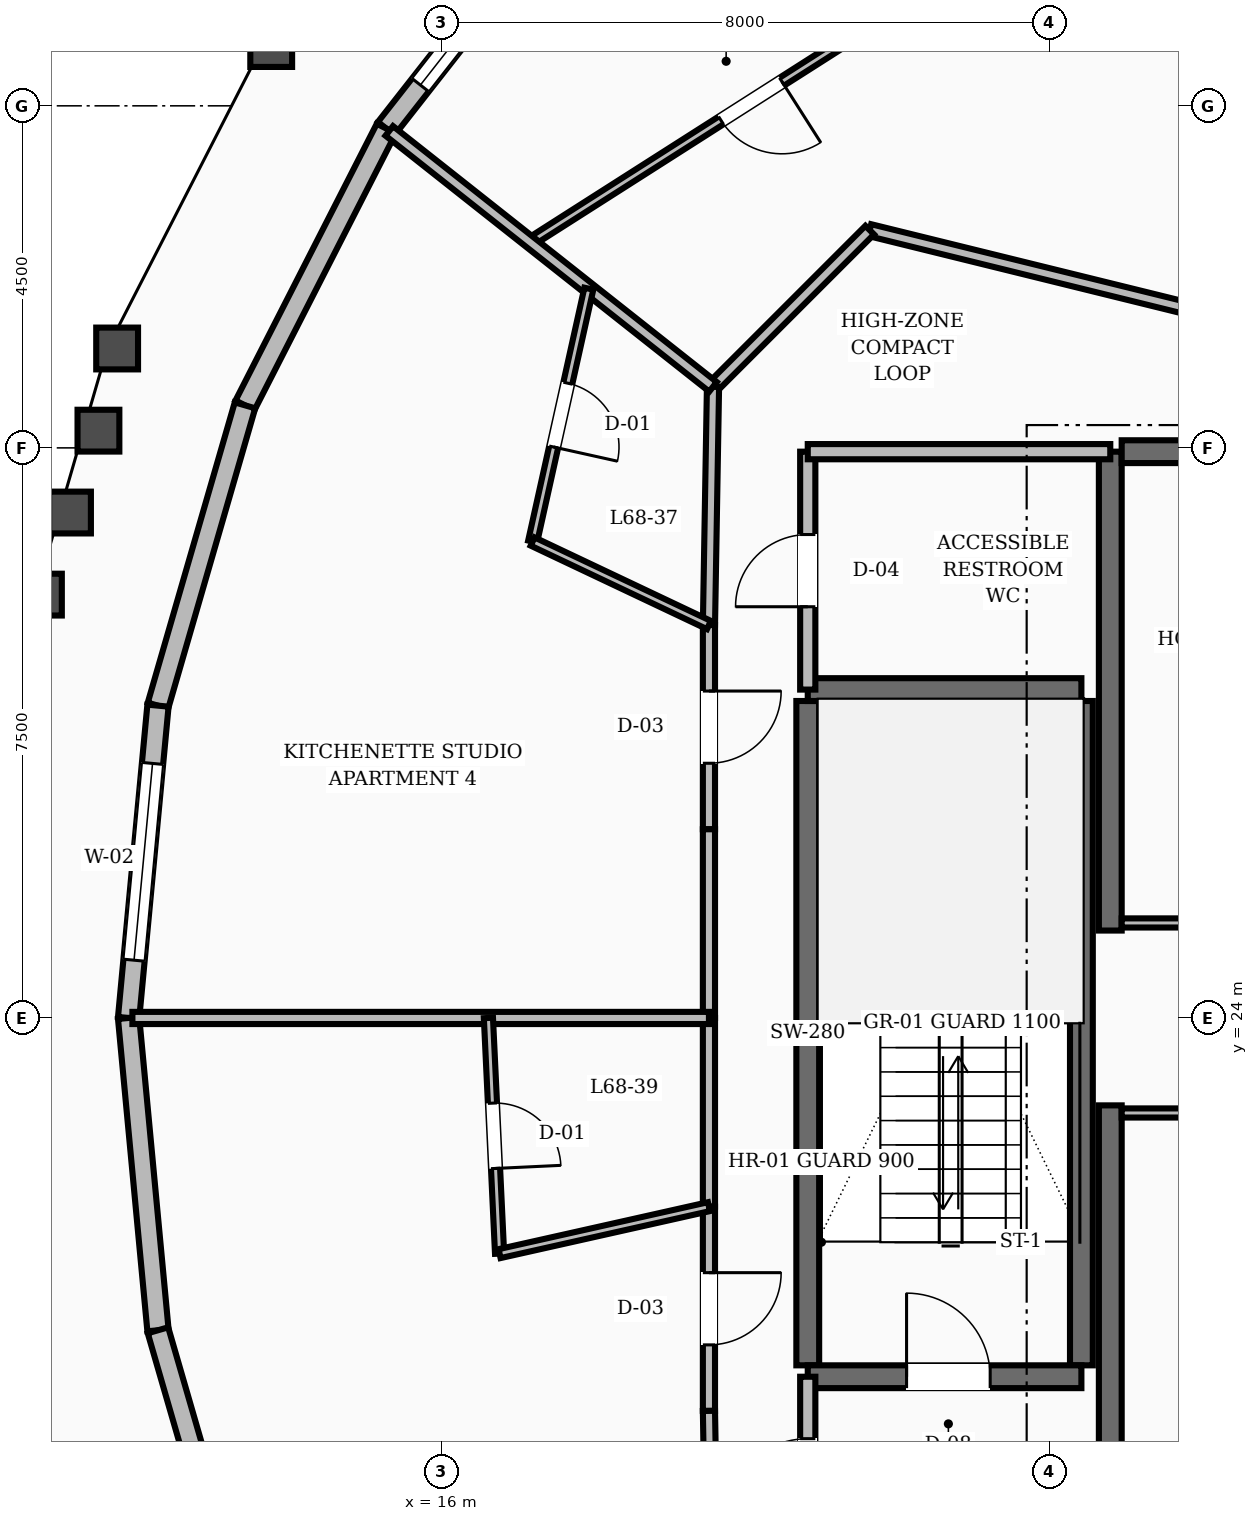
"""IFC4 building model, lengths in metres.
Left out: names, types, materials, properties, quantities, classifications, styles, units other than length and angle.
Written with IfcOpenShell. Run it as: python <this file> out.ifc"""

import sys

from ifc_helpers import new_model, si_unit, direction, frame, frame_2d, origin, place, context, subcontext, project, spatial, rectangle, extrude, element, fill, save


model = new_model("IFC4")
c1 = context("Model", 3, precision=1e-05, world=origin(), true_north=direction((0.0, 1.0)))
c2 = subcontext(c1, "Body", "Model", "MODEL_VIEW")
j1 = project(units=[si_unit("LENGTHUNIT", "METRE"), si_unit("PLANEANGLEUNIT", "RADIAN")], contexts=[c1])
p1 = place(None, origin())
s1 = spatial("IfcSite", under=j1, at=p1, CompositionType="ELEMENT")
p2 = place(p1, origin())
s2 = spatial("IfcBuilding", under=s1, at=p2, CompositionType="ELEMENT")
p3 = place(p2, frame((0.0, 0.0, 261.6)))
s3 = spatial("IfcBuildingStorey", under=s2, at=p3, CompositionType="ELEMENT", Elevation=261.6)
for number, where, z_axis, x_axis in (
    (1, (24.8, 16.55, 0.0), (0.0, 0.0, 1.0), (0.0, 1.0, 0.0)),
    (2, (24.8, 25.15, 0.0), (0.0, 0.0, 1.0), (0.0, 1.0, 0.0)),
):
    element("IfcWall", number, at=place(p3, frame(where, z_axis=z_axis, x_axis=x_axis)), inside=s3, PredefinedType="SHEAR", context=c2, shape_type="SweptSolid", body=[
        extrude(rectangle(XDim=6.3, YDim=0.3, at=frame_2d((3.15, 0.0))), origin(), (0.0, 0.0, 1.0), 3.6),
    ])
p4 = place(p3, frame((24.95, 31.45, 0.0), z_axis=(0.0, 0.0, 1.0), x_axis=(1.0, 0.0, 0.0)))
e3 = element("IfcWall", 3, at=p4, inside=s3, PredefinedType="SHEAR", context=c2, shape_type="SweptSolid", body=[
    extrude(rectangle(XDim=3.25, YDim=0.3, at=frame_2d((1.625, 0.0))), origin(), (0.0, 0.0, 1.0), 3.6),
])
for number, where, z_axis, x_axis in (
    (4, (20.82, 19.43, 0.0), (0.0, 0.0, 1.0), (0.0, 1.0, 0.0)),
    (5, (24.42, 19.43, 0.0), (0.0, 0.0, 1.0), (0.0, 1.0, 0.0)),
):
    element("IfcWall", number, at=place(p3, frame(where, z_axis=z_axis, x_axis=x_axis)), inside=s3, PredefinedType="SHEAR", context=c2, shape_type="SweptSolid", body=[
        extrude(rectangle(XDim=8.74, YDim=0.3, at=frame_2d((4.37, 0.0))), origin(), (0.0, 0.0, 1.0), 3.6),
    ])
p5 = place(p3, frame((20.82, 19.28, 0.0), z_axis=(0.0, 0.0, 1.0), x_axis=(1.0, 0.0, 0.0)))
e6 = element("IfcWall", 6, at=p5, inside=s3, PredefinedType="SHEAR", context=c2, shape_type="SweptSolid", body=[
    extrude(rectangle(XDim=3.6, YDim=0.3, at=frame_2d((1.8, 0.0))), origin(), (0.0, 0.0, 1.0), 3.6),
])
p6 = place(p5, frame((1.3, 0.0, 0.0)))
e7 = element("IfcOpeningElement", 7, at=p6, cuts=e6, PredefinedType="OPENING", context=c2, shape_type="SweptSolid", body=[
    extrude(rectangle(XDim=1.1, YDim=2.1, at=frame_2d((0.55, 1.05))), frame((0.0, 0.16, 0.0), z_axis=(0.0, -1.0, 0.0), x_axis=(1.0, 0.0, 0.0)), (0.0, 0.0, 1.0), 0.32),
])
p7 = place(p3, frame((20.82, 28.32, 0.0), z_axis=(0.0, 0.0, 1.0), x_axis=(1.0, 0.0, 0.0)))
e8 = element("IfcWall", 8, at=p7, inside=s3, PredefinedType="SHEAR", context=c2, shape_type="SweptSolid", body=[
    extrude(rectangle(XDim=3.6, YDim=0.3, at=frame_2d((1.8, 0.0))), origin(), (0.0, 0.0, 1.0), 3.6),
])
p8 = place(p3, frame((17.777, 38.893, 0.0), z_axis=(0.0, 0.0, 1.0), x_axis=(-0.616903837432, -0.787038534864, 0.0)))
e9 = element("IfcWall", 9, at=p8, inside=s3, PredefinedType="STANDARD", context=c2, shape_type="SweptSolid", body=[
    extrude(rectangle(XDim=4.055, YDim=0.28, at=frame_2d((2.028, 0.0))), origin(), (0.0, 0.0, 1.0), 2.88),
])
p9 = place(p8, frame((0.728, 0.0, 0.8)))
e10 = element("IfcOpeningElement", 10, at=p9, cuts=e9, PredefinedType="OPENING", context=c2, shape_type="SweptSolid", body=[
    extrude(rectangle(XDim=2.6, YDim=1.65, at=frame_2d((1.3, 0.825))), frame((0.0, 0.15, 0.0), z_axis=(0.0, -1.0, 0.0), x_axis=(1.0, 0.0, 0.0)), (0.0, 0.0, 1.0), 0.3),
])
p10 = place(p3, frame((15.275, 35.701, 0.0), z_axis=(0.0, 0.0, 1.0), x_axis=(-0.454698544749, -0.89064540273, 0.0)))
e11 = element("IfcWall", 11, at=p10, inside=s3, PredefinedType="STANDARD", context=c2, shape_type="SweptSolid", body=[
    extrude(rectangle(XDim=4.088, YDim=0.28, at=frame_2d((2.044, 0.0))), origin(), (0.0, 0.0, 1.0), 2.88),
])
p11 = place(p3, frame((13.416, 32.06, 0.0), z_axis=(0.0, 0.0, 1.0), x_axis=(-0.278246863013, -0.960509595592, 0.0)))
e12 = element("IfcWall", 12, at=p11, inside=s3, PredefinedType="STANDARD", context=c2, shape_type="SweptSolid", body=[
    extrude(rectangle(XDim=4.113, YDim=0.28, at=frame_2d((2.057, 0.0))), origin(), (0.0, 0.0, 1.0), 2.88),
])
p12 = place(p3, frame((12.271, 28.109, 0.0), z_axis=(0.0, 0.0, 1.0), x_axis=(-0.093644905581, -0.995605660721, 0.0)))
e13 = element("IfcWall", 13, at=p12, inside=s3, PredefinedType="STANDARD", context=c2, shape_type="SweptSolid", body=[
    extrude(rectangle(XDim=4.127, YDim=0.28, at=frame_2d((2.063, 0.0))), origin(), (0.0, 0.0, 1.0), 2.88),
])
p13 = place(p12, frame((0.763, 0.0, 0.8)))
e14 = element("IfcOpeningElement", 14, at=p13, cuts=e13, PredefinedType="OPENING", context=c2, shape_type="SweptSolid", body=[
    extrude(rectangle(XDim=2.6, YDim=1.65, at=frame_2d((1.3, 0.825))), frame((0.0, 0.15, 0.0), z_axis=(0.0, -1.0, 0.0), x_axis=(1.0, 0.0, 0.0)), (0.0, 0.0, 1.0), 0.3),
])
p14 = place(p3, frame((11.885, 24.0, 0.0), z_axis=(0.0, 0.0, 1.0), x_axis=(0.093644905581, -0.995605660721, 0.0)))
e15 = element("IfcWall", 15, at=p14, inside=s3, PredefinedType="STANDARD", context=c2, shape_type="SweptSolid", body=[
    extrude(rectangle(XDim=4.127, YDim=0.28, at=frame_2d((2.063, 0.0))), origin(), (0.0, 0.0, 1.0), 2.88),
])
p15 = place(p3, frame((12.271, 19.891, 0.0), z_axis=(0.0, 0.0, 1.0), x_axis=(0.278246863013, -0.960509595592, 0.0)))
e16 = element("IfcWall", 16, at=p15, inside=s3, PredefinedType="STANDARD", context=c2, shape_type="SweptSolid", body=[
    extrude(rectangle(XDim=4.113, YDim=0.28, at=frame_2d((2.057, 0.0))), origin(), (0.0, 0.0, 1.0), 2.88),
])
p16 = place(p3, frame((20.82, 16.55, 0.0), z_axis=(0.0, 0.0, 1.0), x_axis=(0.0, 1.0, 0.0)))
e17 = element("IfcWall", 17, at=p16, inside=s3, PredefinedType="SOLIDWALL", context=c2, shape_type="SweptSolid", body=[
    extrude(rectangle(XDim=2.73, YDim=0.2, at=frame_2d((1.365, 0.0))), origin(), (0.0, 0.0, 1.0), 2.87),
])
p17 = place(p16, frame((0.815, 0.0, 0.0)))
e18 = element("IfcOpeningElement", 18, at=p17, cuts=e17, PredefinedType="OPENING", context=c2, shape_type="SweptSolid", body=[
    extrude(rectangle(XDim=1.1, YDim=2.1, at=frame_2d((0.55, 1.05))), frame((0.0, 0.11, 0.0), z_axis=(0.0, -1.0, 0.0), x_axis=(1.0, 0.0, 0.0)), (0.0, 0.0, 1.0), 0.22),
])
p18 = place(p3, frame((20.82, 28.32, 0.0), z_axis=(0.0, 0.0, 1.0), x_axis=(0.0, 1.0, 0.0)))
e19 = element("IfcWall", 19, at=p18, inside=s3, PredefinedType="SOLIDWALL", context=c2, shape_type="SweptSolid", body=[
    extrude(rectangle(XDim=3.13, YDim=0.2, at=frame_2d((1.565, 0.0))), origin(), (0.0, 0.0, 1.0), 2.87),
])
p19 = place(p18, frame((1.09, 0.0, 0.0)))
e20 = element("IfcOpeningElement", 20, at=p19, cuts=e19, PredefinedType="OPENING", context=c2, shape_type="SweptSolid", body=[
    extrude(rectangle(XDim=0.95, YDim=2.1, at=frame_2d((0.475, 1.05))), frame((0.0, 0.11, 0.0), z_axis=(0.0, -1.0, 0.0), x_axis=(1.0, 0.0, 0.0)), (0.0, 0.0, 1.0), 0.22),
])
p20 = place(p3, frame((20.82, 31.45, 0.0), z_axis=(0.0, 0.0, 1.0), x_axis=(1.0, 0.0, 0.0)))
e21 = element("IfcWall", 21, at=p20, inside=s3, PredefinedType="SOLIDWALL", context=c2, shape_type="SweptSolid", body=[
    extrude(rectangle(XDim=3.98, YDim=0.2, at=frame_2d((1.99, 0.0))), origin(), (0.0, 0.0, 1.0), 2.87),
])
p21 = place(p3, frame((24.95, 25.25, 0.0), z_axis=(0.0, 0.0, 1.0), x_axis=(1.0, 0.0, 0.0)))
e22 = element("IfcWall", 22, at=p21, inside=s3, PredefinedType="PARTITIONING", context=c2, shape_type="SweptSolid", body=[
    extrude(rectangle(XDim=3.2, YDim=0.12, at=frame_2d((1.6, 0.0))), origin(), (0.0, 0.0, 1.0), 2.87),
])
p22 = place(p21, frame((1.125, 0.0, 0.0)))
e23 = element("IfcOpeningElement", 23, at=p22, cuts=e22, PredefinedType="OPENING", context=c2, shape_type="SweptSolid", body=[
    extrude(rectangle(XDim=0.95, YDim=2.1, at=frame_2d((0.475, 1.05))), frame((0.0, 0.07, 0.0), z_axis=(0.0, -1.0, 0.0), x_axis=(1.0, 0.0, 0.0)), (0.0, 0.0, 1.0), 0.14),
])
p23 = place(p3, frame((24.95, 22.75, 0.0), z_axis=(0.0, 0.0, 1.0), x_axis=(1.0, 0.0, 0.0)))
e24 = element("IfcWall", 24, at=p23, inside=s3, PredefinedType="PARTITIONING", context=c2, shape_type="SweptSolid", body=[
    extrude(rectangle(XDim=3.2, YDim=0.12, at=frame_2d((1.6, 0.0))), origin(), (0.0, 0.0, 1.0), 2.87),
])
p24 = place(p23, frame((1.125, 0.0, 0.0)))
e25 = element("IfcOpeningElement", 25, at=p24, cuts=e24, PredefinedType="OPENING", context=c2, shape_type="SweptSolid", body=[
    extrude(rectangle(XDim=0.95, YDim=2.1, at=frame_2d((0.475, 1.05))), frame((0.0, 0.07, 0.0), z_axis=(0.0, -1.0, 0.0), x_axis=(1.0, 0.0, 0.0)), (0.0, 0.0, 1.0), 0.14),
])
p25 = place(p3, frame((25.752, 33.35, 0.0), z_axis=(0.0, 0.0, 1.0), x_axis=(-0.970939799552, 0.239323850978, 0.0)))
e26 = element("IfcWall", 26, at=p25, inside=s3, PredefinedType="SOLIDWALL", context=c2, shape_type="SweptSolid", body=[
    extrude(rectangle(XDim=4.241, YDim=0.16, at=frame_2d((2.12, 0.0))), origin(), (0.0, 0.0, 1.0), 2.87),
])
p26 = place(p3, frame((21.635, 34.365, 0.0), z_axis=(0.0, 0.0, 1.0), x_axis=(-0.707106781187, -0.707106781187, 0.0)))
e27 = element("IfcWall", 27, at=p26, inside=s3, PredefinedType="SOLIDWALL", context=c2, shape_type="SweptSolid", body=[
    extrude(rectangle(XDim=2.916, YDim=0.16, at=frame_2d((1.458, 0.0))), origin(), (0.0, 0.0, 1.0), 2.87),
])
p27 = place(p3, frame((19.573, 32.303, 0.0), z_axis=(0.0, 0.0, 1.0), x_axis=(-0.016981035134, -0.999855811828, 0.0)))
e28 = element("IfcWall", 28, at=p27, inside=s3, PredefinedType="SOLIDWALL", context=c2, shape_type="SweptSolid", body=[
    extrude(rectangle(XDim=3.134, YDim=0.16, at=frame_2d((1.567, 0.0))), origin(), (0.0, 0.0, 1.0), 2.87),
])
p28 = place(p3, frame((19.52, 29.169, 0.0), z_axis=(0.0, 0.0, 1.0), x_axis=(0.0, -1.0, 0.0)))
e29 = element("IfcWall", 29, at=p28, inside=s3, PredefinedType="SOLIDWALL", context=c2, shape_type="SweptSolid", body=[
    extrude(rectangle(XDim=2.687, YDim=0.16, at=frame_2d((1.344, 0.0))), origin(), (0.0, 0.0, 1.0), 2.87),
])
p29 = place(p28, frame((0.868, 0.0, 0.0)))
e30 = element("IfcOpeningElement", 30, at=p29, cuts=e29, PredefinedType="OPENING", context=c2, shape_type="SweptSolid", body=[
    extrude(rectangle(XDim=0.95, YDim=2.1, at=frame_2d((0.475, 1.05))), frame((0.0, 0.09, 0.0), z_axis=(0.0, -1.0, 0.0), x_axis=(1.0, 0.0, 0.0)), (0.0, 0.0, 1.0), 0.18),
])
for number, where, z_axis, x_axis in (
    (31, (19.52, 26.482, 0.0), (0.0, 0.0, 1.0), (0.0, -1.0, 0.0)),
    (32, (19.52, 24.0, 0.0), (0.0, 0.0, 1.0), (0.0, -1.0, 0.0)),
):
    element("IfcWall", number, at=place(p3, frame(where, z_axis=z_axis, x_axis=x_axis)), inside=s3, PredefinedType="SOLIDWALL", context=c2, shape_type="SweptSolid", body=[
        extrude(rectangle(XDim=2.482, YDim=0.16, at=frame_2d((1.241, 0.0))), origin(), (0.0, 0.0, 1.0), 2.87),
    ])
p30 = place(p3, frame((19.52, 21.518, 0.0), z_axis=(0.0, 0.0, 1.0), x_axis=(0.0, -1.0, 0.0)))
e33 = element("IfcWall", 33, at=p30, inside=s3, PredefinedType="SOLIDWALL", context=c2, shape_type="SweptSolid", body=[
    extrude(rectangle(XDim=2.687, YDim=0.16, at=frame_2d((1.344, 0.0))), origin(), (0.0, 0.0, 1.0), 2.87),
])
p31 = place(p30, frame((0.868, 0.0, 0.0)))
e34 = element("IfcOpeningElement", 34, at=p31, cuts=e33, PredefinedType="OPENING", context=c2, shape_type="SweptSolid", body=[
    extrude(rectangle(XDim=0.95, YDim=2.1, at=frame_2d((0.475, 1.05))), frame((0.0, 0.09, 0.0), z_axis=(0.0, -1.0, 0.0), x_axis=(1.0, 0.0, 0.0)), (0.0, 0.0, 1.0), 0.18),
])
p32 = place(p3, frame((19.52, 18.831, 0.0), z_axis=(0.0, 0.0, 1.0), x_axis=(0.016981035134, -0.999855811828, 0.0)))
e35 = element("IfcWall", 35, at=p32, inside=s3, PredefinedType="SOLIDWALL", context=c2, shape_type="SweptSolid", body=[
    extrude(rectangle(XDim=3.134, YDim=0.16, at=frame_2d((1.567, 0.0))), origin(), (0.0, 0.0, 1.0), 2.87),
])
p33 = place(p3, frame((22.993, 37.921, 0.0), z_axis=(0.0, 0.0, 1.0), x_axis=(-0.843220391553, -0.537568015482, 0.0)))
e36 = element("IfcWall", 36, at=p33, inside=s3, PredefinedType="PARTITIONING", context=c2, shape_type="SweptSolid", body=[
    extrude(rectangle(XDim=6.91, YDim=0.12, at=frame_2d((3.455, 0.0))), origin(), (0.0, 0.0, 1.0), 2.87),
])
p34 = place(p33, frame((2.98, 0.0, 0.0)))
e37 = element("IfcOpeningElement", 37, at=p34, cuts=e36, PredefinedType="OPENING", context=c2, shape_type="SweptSolid", body=[
    extrude(rectangle(XDim=0.95, YDim=2.1, at=frame_2d((0.475, 1.05))), frame((0.0, 0.07, 0.0), z_axis=(0.0, -1.0, 0.0), x_axis=(1.0, 0.0, 0.0)), (0.0, 0.0, 1.0), 0.14),
])
p35 = place(p3, frame((19.573, 32.303, 0.0), z_axis=(0.0, 0.0, 1.0), x_axis=(-0.784496994248, 0.6201326197, 0.0)))
e38 = element("IfcWall", 38, at=p35, inside=s3, PredefinedType="SOLIDWALL", context=c2, shape_type="SweptSolid", body=[
    extrude(rectangle(XDim=5.429, YDim=0.16, at=frame_2d((2.714, 0.0))), origin(), (0.0, 0.0, 1.0), 2.87),
])
p36 = place(p3, frame((17.94, 33.594, 0.0), z_axis=(0.0, 0.0, 1.0), x_axis=(-0.216998726361, -0.976171886892, 0.0)))
e39 = element("IfcWall", 39, at=p36, inside=s3, PredefinedType="PARTITIONING", context=c2, shape_type="SweptSolid", body=[
    extrude(rectangle(XDim=3.408, YDim=0.12, at=frame_2d((1.704, 0.0))), origin(), (0.0, 0.0, 1.0), 2.87),
])
p37 = place(p36, frame((1.274, 0.0, 0.0)))
e40 = element("IfcOpeningElement", 40, at=p37, cuts=e39, PredefinedType="OPENING", context=c2, shape_type="SweptSolid", body=[
    extrude(rectangle(XDim=0.86, YDim=2.1, at=frame_2d((0.43, 1.05))), frame((0.0, 0.07, 0.0), z_axis=(0.0, -1.0, 0.0), x_axis=(1.0, 0.0, 0.0)), (0.0, 0.0, 1.0), 0.14),
])
p38 = place(p3, frame((19.52, 29.169, 0.0), z_axis=(0.0, 0.0, 1.0), x_axis=(-0.90379206637, 0.427971845764, 0.0)))
e41 = element("IfcWall", 41, at=p38, inside=s3, PredefinedType="PARTITIONING", context=c2, shape_type="SweptSolid", body=[
    extrude(rectangle(XDim=2.566, YDim=0.12, at=frame_2d((1.283, 0.0))), origin(), (0.0, 0.0, 1.0), 2.87),
])
p39 = place(p3, frame((19.52, 24.0, 0.0), z_axis=(0.0, 0.0, 1.0), x_axis=(-1.0, 0.0, 0.0)))
e42 = element("IfcWall", 42, at=p39, inside=s3, PredefinedType="SOLIDWALL", context=c2, shape_type="SweptSolid", body=[
    extrude(rectangle(XDim=7.585, YDim=0.16, at=frame_2d((3.792, 0.0))), origin(), (0.0, 0.0, 1.0), 2.87),
])
p40 = place(p3, frame((16.619, 24.0, 0.0), z_axis=(0.0, 0.0, 1.0), x_axis=(0.047273648919, -0.99888197607, 0.0)))
e43 = element("IfcWall", 43, at=p40, inside=s3, PredefinedType="PARTITIONING", context=c2, shape_type="SweptSolid", body=[
    extrude(rectangle(XDim=3.104, YDim=0.12, at=frame_2d((1.552, 0.0))), origin(), (0.0, 0.0, 1.0), 2.87),
])
p41 = place(p40, frame((1.122, 0.0, 0.0)))
e44 = element("IfcOpeningElement", 44, at=p41, cuts=e43, PredefinedType="OPENING", context=c2, shape_type="SweptSolid", body=[
    extrude(rectangle(XDim=0.86, YDim=2.1, at=frame_2d((0.43, 1.05))), frame((0.0, 0.07, 0.0), z_axis=(0.0, -1.0, 0.0), x_axis=(1.0, 0.0, 0.0)), (0.0, 0.0, 1.0), 0.14),
])
p42 = place(p3, frame((19.52, 21.518, 0.0), z_axis=(0.0, 0.0, 1.0), x_axis=(-0.975751695347, -0.218880398912, 0.0)))
e45 = element("IfcWall", 45, at=p42, inside=s3, PredefinedType="PARTITIONING", context=c2, shape_type="SweptSolid", body=[
    extrude(rectangle(XDim=2.823, YDim=0.12, at=frame_2d((1.412, 0.0))), origin(), (0.0, 0.0, 1.0), 2.87),
])
p43 = place(p9, origin())
e46 = element("IfcWindow", 46, at=p43, inside=s3, PartitioningType="SINGLE_PANEL", PredefinedType="WINDOW", context=c2, shape_type="SweptSolid", body=[
    extrude(rectangle(XDim=2.6, YDim=1.65, at=frame_2d((1.3, 0.825))), frame((0.0, 0.03, 0.0), z_axis=(0.0, -1.0, 0.0), x_axis=(1.0, 0.0, 0.0)), (0.0, 0.0, 1.0), 0.06),
])
fill(e10, e46)
p44 = place(p13, origin())
e47 = element("IfcWindow", 47, at=p44, inside=s3, PartitioningType="SINGLE_PANEL", PredefinedType="WINDOW", context=c2, shape_type="SweptSolid", body=[
    extrude(rectangle(XDim=2.6, YDim=1.65, at=frame_2d((1.3, 0.825))), frame((0.0, 0.03, 0.0), z_axis=(0.0, -1.0, 0.0), x_axis=(1.0, 0.0, 0.0)), (0.0, 0.0, 1.0), 0.06),
])
fill(e14, e47)
p45 = place(p6, origin())
e48 = element("IfcDoor", 48, at=p45, inside=s3, OperationType="SINGLE_SWING_LEFT", PredefinedType="DOOR", context=c2, shape_type="SweptSolid", body=[
    extrude(rectangle(XDim=1.1, YDim=2.1, at=frame_2d((0.55, 1.05))), frame((0.0, 0.025, 0.0), z_axis=(0.0, -1.0, 0.0), x_axis=(1.0, 0.0, 0.0)), (0.0, 0.0, 1.0), 0.05),
])
fill(e7, e48)
p46 = place(p17, origin())
e49 = element("IfcDoor", 49, at=p46, inside=s3, OperationType="SINGLE_SWING_LEFT", PredefinedType="DOOR", context=c2, shape_type="SweptSolid", body=[
    extrude(rectangle(XDim=1.1, YDim=2.1, at=frame_2d((0.55, 1.05))), frame((0.0, 0.025, 0.0), z_axis=(0.0, -1.0, 0.0), x_axis=(1.0, 0.0, 0.0)), (0.0, 0.0, 1.0), 0.05),
])
fill(e18, e49)
p47 = place(p19, origin())
e50 = element("IfcDoor", 50, at=p47, inside=s3, OperationType="SINGLE_SWING_LEFT", PredefinedType="DOOR", context=c2, shape_type="SweptSolid", body=[
    extrude(rectangle(XDim=0.95, YDim=2.1, at=frame_2d((0.475, 1.05))), frame((0.0, 0.025, 0.0), z_axis=(0.0, -1.0, 0.0), x_axis=(1.0, 0.0, 0.0)), (0.0, 0.0, 1.0), 0.05),
])
fill(e20, e50)
p48 = place(p34, origin())
e51 = element("IfcDoor", 51, at=p48, inside=s3, OperationType="SINGLE_SWING_LEFT", PredefinedType="DOOR", context=c2, shape_type="SweptSolid", body=[
    extrude(rectangle(XDim=0.95, YDim=2.1, at=frame_2d((0.475, 1.05))), frame((0.0, 0.025, 0.0), z_axis=(0.0, -1.0, 0.0), x_axis=(1.0, 0.0, 0.0)), (0.0, 0.0, 1.0), 0.05),
])
fill(e37, e51)
p49 = place(p37, origin())
e52 = element("IfcDoor", 52, at=p49, inside=s3, OperationType="SINGLE_SWING_RIGHT", PredefinedType="DOOR", context=c2, shape_type="SweptSolid", body=[
    extrude(rectangle(XDim=0.86, YDim=2.1, at=frame_2d((0.43, 1.05))), frame((0.0, 0.025, 0.0), z_axis=(0.0, -1.0, 0.0), x_axis=(1.0, 0.0, 0.0)), (0.0, 0.0, 1.0), 0.05),
])
fill(e40, e52)
p50 = place(p29, origin())
e53 = element("IfcDoor", 53, at=p50, inside=s3, OperationType="SINGLE_SWING_LEFT", PredefinedType="DOOR", context=c2, shape_type="SweptSolid", body=[
    extrude(rectangle(XDim=0.95, YDim=2.1, at=frame_2d((0.475, 1.05))), frame((0.0, 0.025, 0.0), z_axis=(0.0, -1.0, 0.0), x_axis=(1.0, 0.0, 0.0)), (0.0, 0.0, 1.0), 0.05),
])
fill(e30, e53)
p51 = place(p41, origin())
e54 = element("IfcDoor", 54, at=p51, inside=s3, OperationType="SINGLE_SWING_RIGHT", PredefinedType="DOOR", context=c2, shape_type="SweptSolid", body=[
    extrude(rectangle(XDim=0.86, YDim=2.1, at=frame_2d((0.43, 1.05))), frame((0.0, 0.025, 0.0), z_axis=(0.0, -1.0, 0.0), x_axis=(1.0, 0.0, 0.0)), (0.0, 0.0, 1.0), 0.05),
])
fill(e44, e54)
p52 = place(p31, origin())
e55 = element("IfcDoor", 55, at=p52, inside=s3, OperationType="SINGLE_SWING_LEFT", PredefinedType="DOOR", context=c2, shape_type="SweptSolid", body=[
    extrude(rectangle(XDim=0.95, YDim=2.1, at=frame_2d((0.475, 1.05))), frame((0.0, 0.025, 0.0), z_axis=(0.0, -1.0, 0.0), x_axis=(1.0, 0.0, 0.0)), (0.0, 0.0, 1.0), 0.05),
])
fill(e34, e55)
save(model, sys.argv[1])
